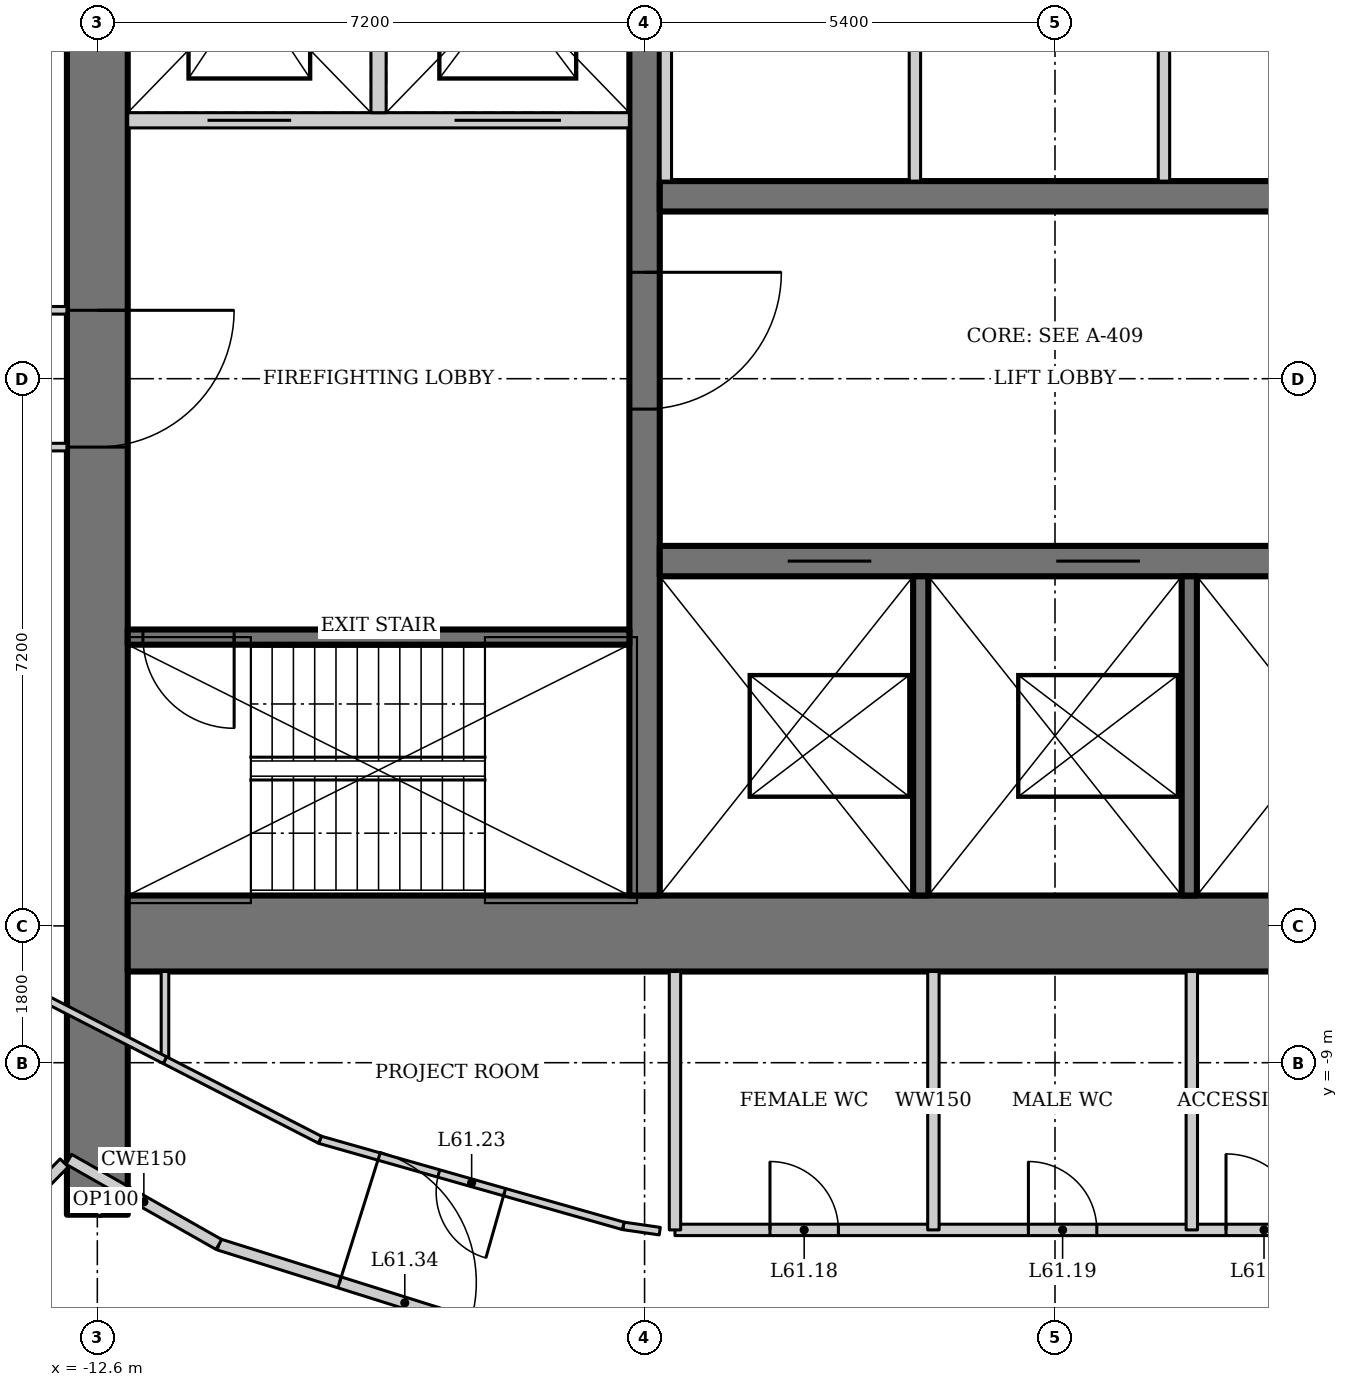
"""IFC4 building model, lengths in metres.
Left out: names, types, materials, properties, quantities, classifications, styles, units other than length and angle.
Written with IfcOpenShell. Run it as: python <this file> out.ifc"""

import sys

from ifc_helpers import new_model, si_unit, direction, frame, frame_2d, origin, place, context, subcontext, project, spatial, rectangle, extrude, element, fill, save


model = new_model("IFC4")
c1 = context("Model", 3, precision=1e-05, world=origin(), true_north=direction((0.0, 1.0)))
c2 = subcontext(c1, "Body", "Model", "MODEL_VIEW")
j1 = project(units=[si_unit("LENGTHUNIT", "METRE"), si_unit("PLANEANGLEUNIT", "RADIAN")], contexts=[c1])
p1 = place(None, origin())
s1 = spatial("IfcSite", under=j1, at=p1, CompositionType="ELEMENT")
p2 = place(p1, origin())
s2 = spatial("IfcBuilding", under=s1, at=p2, CompositionType="ELEMENT")
p3 = place(p2, frame((0.0, 0.0, 262.0)))
s3 = spatial("IfcBuildingStorey", under=s2, at=p3, CompositionType="ELEMENT", Elevation=262.0)
p4 = place(p3, frame((-12.6, 11.0, 0.0), z_axis=(0.0, 0.0, 1.0), x_axis=(0.0, -1.0, 0.0)))
e1 = element("IfcWall", 1, at=p4, inside=s3, PredefinedType="SHEAR", context=c2, shape_type="SweptSolid", body=[
    extrude(rectangle(XDim=22.0, YDim=0.8, at=frame_2d((11.0, 0.0))), origin(), (0.0, 0.0, 1.0), 4.2),
])
p5 = place(p4, frame((10.1, 0.0, 0.0)))
e2 = element("IfcOpeningElement", 2, at=p5, cuts=e1, PredefinedType="OPENING", context=c2, shape_type="SweptSolid", body=[
    extrude(rectangle(XDim=1.8, YDim=2.1, at=frame_2d((0.9, 1.05))), frame((0.0, 0.41, 0.0), z_axis=(0.0, -1.0, 0.0), x_axis=(1.0, 0.0, 0.0)), (0.0, 0.0, 1.0), 0.82),
])
p6 = place(p3, frame((-12.2, -7.3, 0.0), z_axis=(0.0, 0.0, 1.0), x_axis=(1.0, 0.0, 0.0)))
e3 = element("IfcWall", 3, at=p6, inside=s3, PredefinedType="SHEAR", context=c2, shape_type="SweptSolid", body=[
    extrude(rectangle(XDim=24.4, YDim=1.0, at=frame_2d((12.2, 0.0))), origin(), (0.0, 0.0, 1.0), 4.2),
])
p7 = place(p3, frame((-5.4, 7.8, 0.0), z_axis=(0.0, 0.0, 1.0), x_axis=(0.0, -1.0, 0.0)))
e4 = element("IfcWall", 4, at=p7, inside=s3, PredefinedType="SHEAR", context=c2, shape_type="SweptSolid", body=[
    extrude(rectangle(XDim=14.6, YDim=0.4, at=frame_2d((7.3, 0.0))), origin(), (0.0, 0.0, 1.0), 4.2),
])
p8 = place(p7, frame((6.4, 0.0, 0.0)))
e5 = element("IfcOpeningElement", 5, at=p8, cuts=e4, PredefinedType="OPENING", context=c2, shape_type="SweptSolid", body=[
    extrude(rectangle(XDim=1.8, YDim=2.1, at=frame_2d((0.9, 1.05))), frame((0.0, 0.21, 0.0), z_axis=(0.0, -1.0, 0.0), x_axis=(1.0, 0.0, 0.0)), (0.0, 0.0, 1.0), 0.42),
])
p9 = place(p3, frame((-5.2, -2.4, 0.0), z_axis=(0.0, 0.0, 1.0), x_axis=(1.0, 0.0, 0.0)))
e6 = element("IfcWall", 6, at=p9, inside=s3, PredefinedType="SHEAR", context=c2, shape_type="SweptSolid", body=[
    extrude(rectangle(XDim=10.4, YDim=0.4, at=frame_2d((5.2, 0.0))), origin(), (0.0, 0.0, 1.0), 4.2),
])
p10 = place(p9, frame((1.683, 0.0, 0.0)))
e7 = element("IfcOpeningElement", 7, at=p10, cuts=e6, PredefinedType="OPENING", context=c2, shape_type="SweptSolid", body=[
    extrude(rectangle(XDim=1.1, YDim=2.2, at=frame_2d((0.55, 1.1))), frame((0.0, 0.21, 0.0), z_axis=(0.0, -1.0, 0.0), x_axis=(1.0, 0.0, 0.0)), (0.0, 0.0, 1.0), 0.42),
])
p11 = place(p9, frame((5.217, 0.0, 0.0)))
e8 = element("IfcOpeningElement", 8, at=p11, cuts=e6, PredefinedType="OPENING", context=c2, shape_type="SweptSolid", body=[
    extrude(rectangle(XDim=1.1, YDim=2.2, at=frame_2d((0.55, 1.1))), frame((0.0, 0.21, 0.0), z_axis=(0.0, -1.0, 0.0), x_axis=(1.0, 0.0, 0.0)), (0.0, 0.0, 1.0), 0.42),
])
p12 = place(p9, frame((8.75, 0.0, 0.0)))
e9 = element("IfcOpeningElement", 9, at=p12, cuts=e6, PredefinedType="OPENING", context=c2, shape_type="SweptSolid", body=[
    extrude(rectangle(XDim=1.1, YDim=2.2, at=frame_2d((0.55, 1.1))), frame((0.0, 0.21, 0.0), z_axis=(0.0, -1.0, 0.0), x_axis=(1.0, 0.0, 0.0)), (0.0, 0.0, 1.0), 0.42),
])
for number, where, z_axis, x_axis in (
    (10, (-1.767, -2.6, 0.0), (0.0, 0.0, 1.0), (0.0, -1.0, 0.0)),
    (11, (1.767, -2.6, 0.0), (0.0, 0.0, 1.0), (0.0, -1.0, 0.0)),
):
    element("IfcWall", number, at=place(p3, frame(where, z_axis=z_axis, x_axis=x_axis)), inside=s3, PredefinedType="SOLIDWALL", context=c2, shape_type="SweptSolid", body=[
        extrude(rectangle(XDim=4.2, YDim=0.2, at=frame_2d((2.1, 0.0))), origin(), (0.0, 0.0, 1.0), 4.2),
    ])
p13 = place(p3, frame((5.2, 2.4, 0.0), z_axis=(0.0, 0.0, 1.0), x_axis=(-1.0, 0.0, 0.0)))
e12 = element("IfcWall", 12, at=p13, inside=s3, PredefinedType="SHEAR", context=c2, shape_type="SweptSolid", body=[
    extrude(rectangle(XDim=10.4, YDim=0.4, at=frame_2d((5.2, 0.0))), origin(), (0.0, 0.0, 1.0), 4.2),
])
p14 = place(p3, frame((-5.6, -3.4, 0.0), z_axis=(0.0, 0.0, 1.0), x_axis=(-1.0, 0.0, 0.0)))
e13 = element("IfcWall", 13, at=p14, inside=s3, PredefinedType="SHEAR", context=c2, shape_type="SweptSolid", body=[
    extrude(rectangle(XDim=6.6, YDim=0.2, at=frame_2d((3.3, 0.0))), origin(), (0.0, 0.0, 1.0), 4.2),
])
p15 = place(p14, frame((5.2, 0.0, 0.0)))
e14 = element("IfcOpeningElement", 14, at=p15, cuts=e13, PredefinedType="OPENING", context=c2, shape_type="SweptSolid", body=[
    extrude(rectangle(XDim=1.2, YDim=2.1, at=frame_2d((0.6, 1.05))), frame((0.0, 0.11, 0.0), z_axis=(0.0, -1.0, 0.0), x_axis=(1.0, 0.0, 0.0)), (0.0, 0.0, 1.0), 0.22),
])
p16 = place(p3, frame((-12.2, 3.4, 0.0), z_axis=(0.0, 0.0, 1.0), x_axis=(1.0, 0.0, 0.0)))
e15 = element("IfcWall", 15, at=p16, inside=s3, PredefinedType="SOLIDWALL", context=c2, shape_type="SweptSolid", body=[
    extrude(rectangle(XDim=6.6, YDim=0.2, at=frame_2d((3.3, 0.0))), origin(), (0.0, 0.0, 1.0), 4.2),
])
p17 = place(p16, frame((1.05, 0.0, 0.0)))
e16 = element("IfcOpeningElement", 16, at=p17, cuts=e15, PredefinedType="OPENING", context=c2, shape_type="SweptSolid", body=[
    extrude(rectangle(XDim=1.1, YDim=2.2, at=frame_2d((0.55, 1.1))), frame((0.0, 0.11, 0.0), z_axis=(0.0, -1.0, 0.0), x_axis=(1.0, 0.0, 0.0)), (0.0, 0.0, 1.0), 0.22),
])
p18 = place(p16, frame((4.3, 0.0, 0.0)))
e17 = element("IfcOpeningElement", 17, at=p18, cuts=e15, PredefinedType="OPENING", context=c2, shape_type="SweptSolid", body=[
    extrude(rectangle(XDim=1.4, YDim=2.2, at=frame_2d((0.7, 1.1))), frame((0.0, 0.11, 0.0), z_axis=(0.0, -1.0, 0.0), x_axis=(1.0, 0.0, 0.0)), (0.0, 0.0, 1.0), 0.22),
])
p19 = place(p3, frame((-8.9, 3.5, 0.0), z_axis=(0.0, 0.0, 1.0), x_axis=(0.0, 1.0, 0.0)))
e18 = element("IfcWall", 18, at=p19, inside=s3, PredefinedType="SOLIDWALL", context=c2, shape_type="SweptSolid", body=[
    extrude(rectangle(XDim=3.3, YDim=0.2, at=frame_2d((1.65, 0.0))), origin(), (0.0, 0.0, 1.0), 4.2),
])
p20 = place(p3, frame((-11.001, -11.392, 0.0), z_axis=(0.0, 0.0, 1.0), x_axis=(0.954031103669, -0.299707612903, 0.0)))
e19 = element("IfcWall", 19, at=p20, inside=s3, PredefinedType="PARTITIONING", context=c2, shape_type="SweptSolid", body=[
    extrude(rectangle(XDim=4.695, YDim=0.15, at=frame_2d((2.348, 0.0))), origin(), (0.0, 0.0, 1.0), 4.05),
])
p21 = place(p20, frame((1.664, 0.0, 0.0)))
e20 = element("IfcOpeningElement", 20, at=p21, cuts=e19, PredefinedType="OPENING", context=c2, shape_type="SweptSolid", body=[
    extrude(rectangle(XDim=1.8, YDim=2.1, at=frame_2d((0.9, 1.05))), frame((0.0, 0.085, 0.0), z_axis=(0.0, -1.0, 0.0), x_axis=(1.0, 0.0, 0.0)), (0.0, 0.0, 1.0), 0.17),
])
for number, where, z_axis, x_axis in (
    (21, (-5.12, 2.6, 0.0), (0.0, 0.0, 1.0), (0.0, 1.0, 0.0)),
    (22, (-1.843, 2.6, 0.0), (0.0, 0.0, 1.0), (0.0, 1.0, 0.0)),
):
    element("IfcWall", number, at=place(p3, frame(where, z_axis=z_axis, x_axis=x_axis)), inside=s3, PredefinedType="SOLIDWALL", context=c2, shape_type="SweptSolid", body=[
        extrude(rectangle(XDim=4.4, YDim=0.15, at=frame_2d((2.2, 0.0))), origin(), (0.0, 0.0, 1.0), 4.05),
    ])
p22 = place(p3, frame((1.434, 2.6, 0.0), z_axis=(0.0, 0.0, 1.0), x_axis=(0.0, 1.0, 0.0)))
e23 = element("IfcWall", 23, at=p22, inside=s3, PredefinedType="SOLIDWALL", context=c2, shape_type="SweptSolid", body=[
    extrude(rectangle(XDim=4.4, YDim=0.15, at=frame_2d((2.2, 0.0))), origin(), (0.0, 0.0, 1.0), 3.108),
])
p23 = place(p3, frame((-5.0, -11.2, 0.0), z_axis=(0.0, 0.0, 1.0), x_axis=(1.0, 0.0, 0.0)))
e24 = element("IfcWall", 24, at=p23, inside=s3, PredefinedType="SOLIDWALL", context=c2, shape_type="SweptSolid", body=[
    extrude(rectangle(XDim=10.0, YDim=0.15, at=frame_2d((5.0, 0.0))), origin(), (0.0, 0.0, 1.0), 4.05),
])
p24 = place(p23, frame((1.25, 0.0, 0.0)))
e25 = element("IfcOpeningElement", 25, at=p24, cuts=e24, PredefinedType="OPENING", context=c2, shape_type="SweptSolid", body=[
    extrude(rectangle(XDim=0.9, YDim=2.1, at=frame_2d((0.45, 1.05))), frame((0.0, 0.085, 0.0), z_axis=(0.0, -1.0, 0.0), x_axis=(1.0, 0.0, 0.0)), (0.0, 0.0, 1.0), 0.17),
])
p25 = place(p23, frame((4.65, 0.0, 0.0)))
e26 = element("IfcOpeningElement", 26, at=p25, cuts=e24, PredefinedType="OPENING", context=c2, shape_type="SweptSolid", body=[
    extrude(rectangle(XDim=0.9, YDim=2.1, at=frame_2d((0.45, 1.05))), frame((0.0, 0.085, 0.0), z_axis=(0.0, -1.0, 0.0), x_axis=(1.0, 0.0, 0.0)), (0.0, 0.0, 1.0), 0.17),
])
p26 = place(p23, frame((7.25, 0.0, 0.0)))
e27 = element("IfcOpeningElement", 27, at=p26, cuts=e24, PredefinedType="OPENING", context=c2, shape_type="SweptSolid", body=[
    extrude(rectangle(XDim=1.0, YDim=2.1, at=frame_2d((0.5, 1.05))), frame((0.0, 0.085, 0.0), z_axis=(0.0, -1.0, 0.0), x_axis=(1.0, 0.0, 0.0)), (0.0, 0.0, 1.0), 0.17),
])
p27 = place(p23, frame((8.95, 0.0, 0.0)))
e28 = element("IfcOpeningElement", 28, at=p27, cuts=e24, PredefinedType="OPENING", context=c2, shape_type="SweptSolid", body=[
    extrude(rectangle(XDim=0.8, YDim=2.1, at=frame_2d((0.4, 1.05))), frame((0.0, 0.085, 0.0), z_axis=(0.0, -1.0, 0.0), x_axis=(1.0, 0.0, 0.0)), (0.0, 0.0, 1.0), 0.17),
])
for number, where, z_axis, x_axis in (
    (29, (-5.0, -7.8, 0.0), (0.0, 0.0, 1.0), (0.0, -1.0, 0.0)),
    (30, (-1.6, -7.8, 0.0), (0.0, 0.0, 1.0), (0.0, -1.0, 0.0)),
):
    element("IfcWall", number, at=place(p3, frame(where, z_axis=z_axis, x_axis=x_axis)), inside=s3, PredefinedType="SOLIDWALL", context=c2, shape_type="SweptSolid", body=[
        extrude(rectangle(XDim=3.4, YDim=0.15, at=frame_2d((1.7, 0.0))), origin(), (0.0, 0.0, 1.0), 4.05),
    ])
p28 = place(p3, frame((1.8, -7.8, 0.0), z_axis=(0.0, 0.0, 1.0), x_axis=(0.0, -1.0, 0.0)))
e31 = element("IfcWall", 31, at=p28, inside=s3, PredefinedType="SOLIDWALL", context=c2, shape_type="SweptSolid", body=[
    extrude(rectangle(XDim=3.4, YDim=0.15, at=frame_2d((1.7, 0.0))), origin(), (0.0, 0.0, 1.0), 3.293),
])
p29 = place(p3, frame((-11.71, -7.8, 0.0), z_axis=(0.0, 0.0, 1.0), x_axis=(0.0, -1.0, 0.0)))
e32 = element("IfcWall", 32, at=p29, inside=s3, PredefinedType="PARTITIONING", context=c2, shape_type="SweptSolid", body=[
    extrude(rectangle(XDim=1.167, YDim=0.1, at=frame_2d((0.583, 0.0))), origin(), (0.0, 0.0, 1.0), 4.05),
])
p30 = place(p3, frame((-5.2, -11.216, 0.0), z_axis=(0.0, 0.0, 1.0), x_axis=(-0.989797891768, 0.142478536811, 0.0)))
e33 = element("IfcWall", 33, at=p30, inside=s3, PredefinedType="PARTITIONING", context=c2, shape_type="SweptSolid", body=[
    extrude(rectangle(XDim=0.485, YDim=0.1, at=frame_2d((0.242, 0.0))), origin(), (0.0, 0.0, 1.0), 4.05),
])
p31 = place(p3, frame((-5.68, -11.147, 0.0), z_axis=(0.0, 0.0, 1.0), x_axis=(-0.961973498971, 0.273142796496, 0.0)))
e34 = element("IfcWall", 34, at=p31, inside=s3, PredefinedType="PARTITIONING", context=c2, shape_type="SweptSolid", body=[
    extrude(rectangle(XDim=4.148, YDim=0.1, at=frame_2d((2.074, 0.0))), origin(), (0.0, 0.0, 1.0), 4.05),
])
p32 = place(p31, frame((1.624, 0.0, 0.0)))
e35 = element("IfcOpeningElement", 35, at=p32, cuts=e34, PredefinedType="OPENING", context=c2, shape_type="SweptSolid", body=[
    extrude(rectangle(XDim=0.9, YDim=2.1, at=frame_2d((0.45, 1.05))), frame((0.0, 0.06, 0.0), z_axis=(0.0, -1.0, 0.0), x_axis=(1.0, 0.0, 0.0)), (0.0, 0.0, 1.0), 0.12),
])
p33 = place(p3, frame((-9.67, -10.014, 0.0), z_axis=(0.0, 0.0, 1.0), x_axis=(-0.889605609385, 0.456729525814, 0.0)))
e36 = element("IfcWall", 36, at=p33, inside=s3, PredefinedType="PARTITIONING", context=c2, shape_type="SweptSolid", body=[
    extrude(rectangle(XDim=2.293, YDim=0.1, at=frame_2d((1.146, 0.0))), origin(), (0.0, 0.0, 1.0), 4.05),
])
p34 = place(p3, frame((-12.6, -11.0, 0.0), z_axis=(0.0, 0.0, 1.0), x_axis=(0.493794495037, 0.869578631678, 0.0)))
e37 = element("IfcWall", 37, at=p34, inside=s3, PredefinedType="PARTITIONING", context=c2, shape_type="SweptSolid", body=[
    extrude(rectangle(XDim=0.449, YDim=0.1, at=frame_2d((0.225, 0.0))), origin(), (0.0, 0.0, 1.0), 4.05),
])
p35 = place(p3, frame((-15.165, -0.9, 0.0), z_axis=(0.0, 0.0, 1.0), x_axis=(1.0, 0.0, 0.0)))
e38 = element("IfcWall", 38, at=p35, inside=s3, PredefinedType="PARTITIONING", context=c2, shape_type="SweptSolid", body=[
    extrude(rectangle(XDim=2.165, YDim=0.1, at=frame_2d((1.083, 0.0))), origin(), (0.0, 0.0, 1.0), 4.05),
])
p36 = place(p35, frame((0.1, 0.0, 0.0)))
e39 = element("IfcOpeningElement", 39, at=p36, cuts=e38, PredefinedType="OPENING", context=c2, shape_type="SweptSolid", body=[
    extrude(rectangle(XDim=0.9, YDim=2.1, at=frame_2d((0.45, 1.05))), frame((0.0, 0.06, 0.0), z_axis=(0.0, -1.0, 0.0), x_axis=(1.0, 0.0, 0.0)), (0.0, 0.0, 1.0), 0.12),
])
p37 = place(p3, frame((-13.0, 0.9, 0.0), z_axis=(0.0, 0.0, 1.0), x_axis=(-1.0, 0.0, 0.0)))
e40 = element("IfcWall", 40, at=p37, inside=s3, PredefinedType="PARTITIONING", context=c2, shape_type="SweptSolid", body=[
    extrude(rectangle(XDim=2.165, YDim=0.1, at=frame_2d((1.083, 0.0))), origin(), (0.0, 0.0, 1.0), 4.05),
])
p38 = place(p37, frame((1.15, 0.0, 0.0)))
e41 = element("IfcOpeningElement", 41, at=p38, cuts=e40, PredefinedType="OPENING", context=c2, shape_type="SweptSolid", body=[
    extrude(rectangle(XDim=0.9, YDim=2.1, at=frame_2d((0.45, 1.05))), frame((0.0, 0.06, 0.0), z_axis=(0.0, -1.0, 0.0), x_axis=(1.0, 0.0, 0.0)), (0.0, 0.0, 1.0), 0.12),
])
p39 = place(p3, frame((-12.975, -10.271, 0.0), z_axis=(0.0, 0.0, 1.0), x_axis=(0.869722107117, -0.493541747366, 0.0)))
e42 = element("IfcWall", 42, at=p39, inside=s3, PredefinedType="PARTITIONING", context=c2, shape_type="SweptSolid", body=[
    extrude(rectangle(XDim=2.27, YDim=0.15, at=frame_2d((1.135, 0.0))), origin(), (0.0, 0.0, 1.0), 4.05),
])
p40 = place(p3, frame((-11.71, -8.967, 0.0), z_axis=(0.0, 0.0, 1.0), x_axis=(-0.889638356137, 0.456665736935, 0.0)))
e43 = element("IfcWall", 43, at=p40, inside=s3, PredefinedType="PARTITIONING", context=c2, shape_type="SweptSolid", body=[
    extrude(rectangle(XDim=1.917, YDim=0.1, at=frame_2d((0.958, 0.0))), origin(), (0.0, 0.0, 1.0), 4.05),
])
p41 = place(p3, frame((-13.036, -10.319, 0.0), z_axis=(0.0, 0.0, 1.0), x_axis=(-0.701113567316, -0.713049623606, 0.0)))
e44 = element("IfcWall", 44, at=p41, inside=s3, PredefinedType="PARTITIONING", context=c2, shape_type="SweptSolid", body=[
    extrude(rectangle(XDim=1.411, YDim=0.15, at=frame_2d((0.706, 0.0))), origin(), (0.0, 0.0, 1.0), 4.05),
])
p42 = place(p8, origin())
e45 = element("IfcDoor", 45, at=p42, inside=s3, OperationType="DOUBLE_DOOR_DOUBLE_SWING", PredefinedType="DOOR", context=c2, shape_type="SweptSolid", body=[
    extrude(rectangle(XDim=1.8, YDim=2.1, at=frame_2d((0.9, 1.05))), frame((0.0, 0.025, 0.0), z_axis=(0.0, -1.0, 0.0), x_axis=(1.0, 0.0, 0.0)), (0.0, 0.0, 1.0), 0.05),
])
fill(e5, e45)
p43 = place(p15, origin())
e46 = element("IfcDoor", 46, at=p43, inside=s3, OperationType="SINGLE_SWING_RIGHT", PredefinedType="DOOR", context=c2, shape_type="SweptSolid", body=[
    extrude(rectangle(XDim=1.2, YDim=2.1, at=frame_2d((0.6, 1.05))), frame((0.0, 0.025, 0.0), z_axis=(0.0, -1.0, 0.0), x_axis=(1.0, 0.0, 0.0)), (0.0, 0.0, 1.0), 0.05),
])
fill(e14, e46)
p44 = place(p5, origin())
e47 = element("IfcDoor", 47, at=p44, inside=s3, OperationType="DOUBLE_DOOR_DOUBLE_SWING", PredefinedType="DOOR", context=c2, shape_type="SweptSolid", body=[
    extrude(rectangle(XDim=1.8, YDim=2.1, at=frame_2d((0.9, 1.05))), frame((0.0, 0.025, 0.0), z_axis=(0.0, -1.0, 0.0), x_axis=(1.0, 0.0, 0.0)), (0.0, 0.0, 1.0), 0.05),
])
fill(e2, e47)
p45 = place(p10, origin())
e48 = element("IfcDoor", 48, at=p45, inside=s3, OperationType="DOUBLE_DOOR_SLIDING", PredefinedType="DOOR", context=c2, shape_type="SweptSolid", body=[
    extrude(rectangle(XDim=1.1, YDim=2.2, at=frame_2d((0.55, 1.1))), frame((0.0, 0.025, 0.0), z_axis=(0.0, -1.0, 0.0), x_axis=(1.0, 0.0, 0.0)), (0.0, 0.0, 1.0), 0.05),
])
fill(e7, e48)
p46 = place(p11, origin())
e49 = element("IfcDoor", 49, at=p46, inside=s3, OperationType="DOUBLE_DOOR_SLIDING", PredefinedType="DOOR", context=c2, shape_type="SweptSolid", body=[
    extrude(rectangle(XDim=1.1, YDim=2.2, at=frame_2d((0.55, 1.1))), frame((0.0, 0.025, 0.0), z_axis=(0.0, -1.0, 0.0), x_axis=(1.0, 0.0, 0.0)), (0.0, 0.0, 1.0), 0.05),
])
fill(e8, e49)
p47 = place(p17, origin())
e50 = element("IfcDoor", 50, at=p47, inside=s3, OperationType="DOUBLE_DOOR_SLIDING", PredefinedType="DOOR", context=c2, shape_type="SweptSolid", body=[
    extrude(rectangle(XDim=1.1, YDim=2.2, at=frame_2d((0.55, 1.1))), frame((0.0, 0.025, 0.0), z_axis=(0.0, -1.0, 0.0), x_axis=(1.0, 0.0, 0.0)), (0.0, 0.0, 1.0), 0.05),
])
fill(e16, e50)
p48 = place(p18, origin())
e51 = element("IfcDoor", 51, at=p48, inside=s3, OperationType="DOUBLE_DOOR_SLIDING", PredefinedType="DOOR", context=c2, shape_type="SweptSolid", body=[
    extrude(rectangle(XDim=1.4, YDim=2.2, at=frame_2d((0.7, 1.1))), frame((0.0, 0.025, 0.0), z_axis=(0.0, -1.0, 0.0), x_axis=(1.0, 0.0, 0.0)), (0.0, 0.0, 1.0), 0.05),
])
fill(e17, e51)
p49 = place(p24, origin())
e52 = element("IfcDoor", 52, at=p49, inside=s3, OperationType="SINGLE_SWING_LEFT", PredefinedType="DOOR", context=c2, shape_type="SweptSolid", body=[
    extrude(rectangle(XDim=0.9, YDim=2.1, at=frame_2d((0.45, 1.05))), frame((0.0, 0.025, 0.0), z_axis=(0.0, -1.0, 0.0), x_axis=(1.0, 0.0, 0.0)), (0.0, 0.0, 1.0), 0.05),
])
fill(e25, e52)
p50 = place(p25, origin())
e53 = element("IfcDoor", 53, at=p50, inside=s3, OperationType="SINGLE_SWING_LEFT", PredefinedType="DOOR", context=c2, shape_type="SweptSolid", body=[
    extrude(rectangle(XDim=0.9, YDim=2.1, at=frame_2d((0.45, 1.05))), frame((0.0, 0.025, 0.0), z_axis=(0.0, -1.0, 0.0), x_axis=(1.0, 0.0, 0.0)), (0.0, 0.0, 1.0), 0.05),
])
fill(e26, e53)
p51 = place(p26, origin())
e54 = element("IfcDoor", 54, at=p51, inside=s3, OperationType="SINGLE_SWING_LEFT", PredefinedType="DOOR", context=c2, shape_type="SweptSolid", body=[
    extrude(rectangle(XDim=1.0, YDim=2.1, at=frame_2d((0.5, 1.05))), frame((0.0, 0.025, 0.0), z_axis=(0.0, -1.0, 0.0), x_axis=(1.0, 0.0, 0.0)), (0.0, 0.0, 1.0), 0.05),
])
fill(e27, e54)
p52 = place(p32, origin())
e55 = element("IfcDoor", 55, at=p52, inside=s3, OperationType="SINGLE_SWING_LEFT", PredefinedType="DOOR", context=c2, shape_type="SweptSolid", body=[
    extrude(rectangle(XDim=0.9, YDim=2.1, at=frame_2d((0.45, 1.05))), frame((0.0, 0.025, 0.0), z_axis=(0.0, -1.0, 0.0), x_axis=(1.0, 0.0, 0.0)), (0.0, 0.0, 1.0), 0.05),
])
fill(e35, e55)
p53 = place(p21, origin())
e56 = element("IfcDoor", 56, at=p53, inside=s3, OperationType="DOUBLE_DOOR_DOUBLE_SWING", PredefinedType="DOOR", context=c2, shape_type="SweptSolid", body=[
    extrude(rectangle(XDim=1.8, YDim=2.1, at=frame_2d((0.9, 1.05))), frame((0.0, 0.025, 0.0), z_axis=(0.0, -1.0, 0.0), x_axis=(1.0, 0.0, 0.0)), (0.0, 0.0, 1.0), 0.05),
])
fill(e20, e56)
save(model, sys.argv[1])
